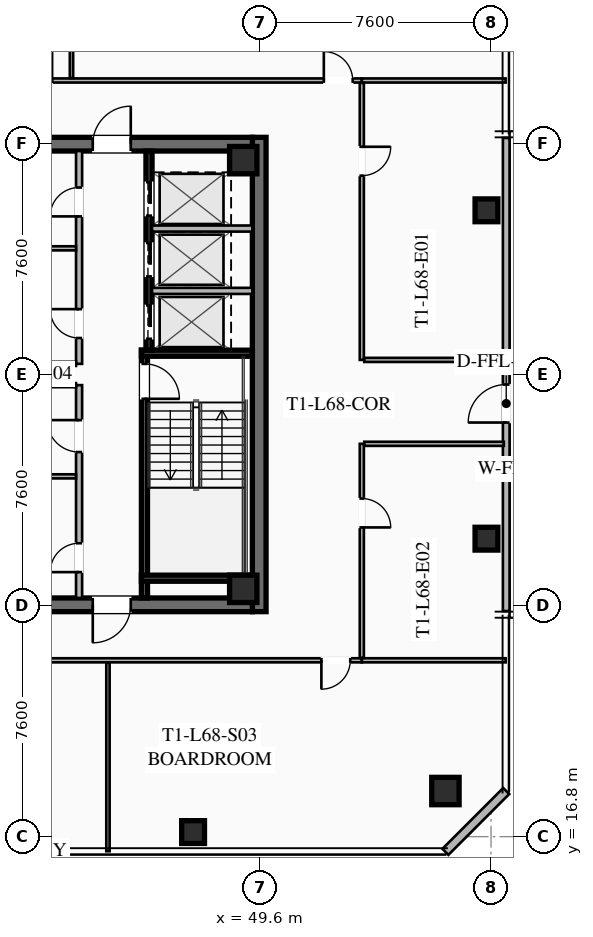
"""IFC4 building model, lengths in metres.
Left out: names, types, materials, properties, quantities, classifications, styles, units other than length and angle.
Written with IfcOpenShell. Run it as: python <this file> out.ifc"""

import sys

from ifc_helpers import new_model, si_unit, direction, frame, frame_2d, origin, origin_2d, place, context, subcontext, project, spatial, rectangle, hollow_rectangle, extrude, element, fill, save


model = new_model("IFC4")
c1 = context("Model", 3, precision=1e-05, world=origin(), true_north=direction((0.0, 1.0)))
c2 = subcontext(c1, "Body", "Model", "MODEL_VIEW")
j1 = project(units=[si_unit("LENGTHUNIT", "METRE"), si_unit("PLANEANGLEUNIT", "RADIAN")], contexts=[c1])
p1 = place(None, origin())
s1 = spatial("IfcSite", under=j1, at=p1, CompositionType="ELEMENT")
p2 = place(p1, origin())
s2 = spatial("IfcBuilding", under=s1, at=p2, CompositionType="ELEMENT")
p3 = place(p2, frame((0.0, 0.0, 251.4)))
s3 = spatial("IfcBuildingStorey", under=s2, at=p3, CompositionType="ELEMENT", Elevation=251.4)
p4 = place(p3, frame((49.575, 39.8, 0.0), z_axis=(0.0, 0.0, 1.0), x_axis=(0.0, -1.0, 0.0)))
e1 = element("IfcWall", 1, at=p4, inside=s3, PredefinedType="SHEAR", context=c2, shape_type="SweptSolid", body=[
    extrude(rectangle(XDim=15.6, YDim=0.45, at=frame_2d((7.8, 0.0))), origin(), (0.0, 0.0, 1.0), 4.0),
])
p5 = place(p3, frame((49.35, 24.425, 0.0), z_axis=(0.0, 0.0, 1.0), x_axis=(-1.0, 0.0, 0.0)))
e2 = element("IfcWall", 2, at=p5, inside=s3, PredefinedType="SHEAR", context=c2, shape_type="SweptSolid", body=[
    extrude(rectangle(XDim=14.7, YDim=0.45, at=frame_2d((7.35, 0.0))), origin(), (0.0, 0.0, 1.0), 4.0),
])
p6 = place(p5, frame((9.05, 0.0, 0.0)))
e3 = element("IfcOpeningElement", 3, at=p6, cuts=e2, PredefinedType="OPENING", context=c2, shape_type="SweptSolid", body=[
    extrude(rectangle(XDim=1.25, YDim=2.25, at=frame_2d((0.625, 1.125))), frame((0.0, 0.235, 0.0), z_axis=(0.0, -1.0, 0.0), x_axis=(1.0, 0.0, 0.0)), (0.0, 0.0, 1.0), 0.47),
])
p7 = place(p5, frame((4.0, 0.0, 0.0)))
e4 = element("IfcOpeningElement", 4, at=p7, cuts=e2, PredefinedType="OPENING", context=c2, shape_type="SweptSolid", body=[
    extrude(rectangle(XDim=1.25, YDim=2.25, at=frame_2d((0.625, 1.125))), frame((0.0, 0.235, 0.0), z_axis=(0.0, -1.0, 0.0), x_axis=(1.0, 0.0, 0.0)), (0.0, 0.0, 1.0), 0.47),
])
p8 = place(p3, frame((34.65, 39.575, 0.0), z_axis=(0.0, 0.0, 1.0), x_axis=(1.0, 0.0, 0.0)))
e5 = element("IfcWall", 5, at=p8, inside=s3, PredefinedType="SHEAR", context=c2, shape_type="SweptSolid", body=[
    extrude(rectangle(XDim=14.7, YDim=0.45, at=frame_2d((7.35, 0.0))), origin(), (0.0, 0.0, 1.0), 4.0),
])
p9 = place(p8, frame((4.4, 0.0, 0.0)))
e6 = element("IfcOpeningElement", 6, at=p9, cuts=e5, PredefinedType="OPENING", context=c2, shape_type="SweptSolid", body=[
    extrude(rectangle(XDim=1.25, YDim=2.25, at=frame_2d((0.625, 1.125))), frame((0.0, 0.235, 0.0), z_axis=(0.0, -1.0, 0.0), x_axis=(1.0, 0.0, 0.0)), (0.0, 0.0, 1.0), 0.47),
])
p10 = place(p8, frame((9.45, 0.0, 0.0)))
e7 = element("IfcOpeningElement", 7, at=p10, cuts=e5, PredefinedType="OPENING", context=c2, shape_type="SweptSolid", body=[
    extrude(rectangle(XDim=1.25, YDim=2.25, at=frame_2d((0.625, 1.125))), frame((0.0, 0.235, 0.0), z_axis=(0.0, -1.0, 0.0), x_axis=(1.0, 0.0, 0.0)), (0.0, 0.0, 1.0), 0.47),
])
for number, where, z_axis, x_axis in (
    (8, (49.05, 24.95, 0.0), (0.0, 0.0, 1.0), (1.0, 0.0, 0.0)),
    (9, (49.05, 39.05, 0.0), (0.0, 0.0, 1.0), (1.0, 0.0, 0.0)),
    (10, (55.7, 18.3, 0.0), (0.0, 0.0, 1.0), (1.0, 0.0, 0.0)),
):
    element("IfcColumn", number, at=place(p3, frame(where, z_axis=z_axis, x_axis=x_axis)), inside=s3, PredefinedType="COLUMN", context=c2, shape_type="SweptSolid", body=[
        extrude(hollow_rectangle(XDim=0.9, YDim=0.9, WallThickness=0.04, at=origin_2d()), origin(), (0.0, 0.0, 1.0), 3.78),
    ])
for number, where, z_axis, x_axis in (
    (11, (47.4, 16.95, 0.0), (0.0, 0.0, 1.0), (1.0, 0.0, 0.0)),
    (12, (57.05, 26.6, 0.0), (0.0, 0.0, 1.0), (1.0, 0.0, 0.0)),
    (13, (57.05, 37.4, 0.0), (0.0, 0.0, 1.0), (1.0, 0.0, 0.0)),
):
    element("IfcColumn", number, at=place(p3, frame(where, z_axis=z_axis, x_axis=x_axis)), inside=s3, PredefinedType="COLUMN", context=c2, shape_type="SweptSolid", body=[
        extrude(hollow_rectangle(XDim=0.75, YDim=0.75, WallThickness=0.032, at=origin_2d()), origin(), (0.0, 0.0, 1.0), 3.78),
    ])
p11 = place(p3, frame((57.7, 18.3, 0.0), z_axis=(0.0, 0.0, 1.0), x_axis=(-0.707106781187, -0.707106781187, 0.0)))
e14 = element("IfcWall", 14, at=p11, inside=s3, PredefinedType="SOLIDWALL", context=c2, shape_type="SweptSolid", body=[
    extrude(rectangle(XDim=2.828, YDim=0.28, at=frame_2d((1.414, 0.0))), origin(), (0.0, 0.0, 1.0), 3.78),
])
p12 = place(p3, frame((57.7, 24.22, 0.0), z_axis=(0.0, 0.0, 1.0), x_axis=(0.0, 1.0, 0.0)))
e15 = element("IfcWall", 15, at=p12, inside=s3, PredefinedType="SOLIDWALL", context=c2, shape_type="SweptSolid", body=[
    extrude(rectangle(XDim=15.56, YDim=0.22, at=frame_2d((7.78, 0.0))), origin(), (0.0, 0.0, 1.0), 2.971),
])
p13 = place(p12, frame((6.2, 0.0, 0.0)))
e16 = element("IfcOpeningElement", 16, at=p13, cuts=e15, PredefinedType="OPENING", context=c2, shape_type="SweptSolid", body=[
    extrude(rectangle(XDim=1.25, YDim=2.25, at=frame_2d((0.625, 1.125))), frame((0.0, 0.12, 0.0), z_axis=(0.0, -1.0, 0.0), x_axis=(1.0, 0.0, 0.0)), (0.0, 0.0, 1.0), 0.24),
])
p14 = place(p3, frame((45.8, 32.8, 0.0), z_axis=(0.0, 0.0, 1.0), x_axis=(0.0, -1.0, 0.0)))
e17 = element("IfcWall", 17, at=p14, inside=s3, PredefinedType="SHEAR", context=c2, shape_type="SweptSolid", body=[
    extrude(rectangle(XDim=8.15, YDim=0.2, at=frame_2d((4.075, 0.0))), origin(), (0.0, 0.0, 1.0), 3.78),
])
p15 = place(p14, frame((0.45, 0.0, 0.0)))
e18 = element("IfcOpeningElement", 18, at=p15, cuts=e17, PredefinedType="OPENING", context=c2, shape_type="SweptSolid", body=[
    extrude(rectangle(XDim=1.15, YDim=2.2, at=frame_2d((0.575, 1.1))), frame((0.0, 0.11, 0.0), z_axis=(0.0, -1.0, 0.0), x_axis=(1.0, 0.0, 0.0)), (0.0, 0.0, 1.0), 0.22),
])
for number, where, z_axis, x_axis in (
    (19, (45.7, 32.7, 0.0), (0.0, 0.0, 1.0), (1.0, 0.0, 0.0)),
    (20, (45.7, 25.3, 0.0), (0.0, 0.0, 1.0), (1.0, 0.0, 0.0)),
):
    element("IfcWall", number, at=place(p3, frame(where, z_axis=z_axis, x_axis=x_axis)), inside=s3, PredefinedType="SHEAR", context=c2, shape_type="SweptSolid", body=[
        extrude(rectangle(XDim=3.65, YDim=0.2, at=frame_2d((1.825, 0.0))), origin(), (0.0, 0.0, 1.0), 3.78),
    ])
p16 = place(p3, frame((45.95, 39.35, 0.0), z_axis=(0.0, 0.0, 1.0), x_axis=(0.0, -1.0, 0.0)))
e21 = element("IfcWall", 21, at=p16, inside=s3, PredefinedType="SHEAR", context=c2, shape_type="SweptSolid", body=[
    extrude(rectangle(XDim=6.55, YDim=0.2, at=frame_2d((3.275, 0.0))), origin(), (0.0, 0.0, 1.0), 3.78),
])
p17 = place(p16, frame((5.075, 0.0, 0.0)))
e22 = element("IfcOpeningElement", 22, at=p17, cuts=e21, PredefinedType="OPENING", context=c2, shape_type="SweptSolid", body=[
    extrude(rectangle(XDim=1.1, YDim=2.2, at=frame_2d((0.55, 1.1))), frame((0.0, 0.11, 0.0), z_axis=(0.0, -1.0, 0.0), x_axis=(1.0, 0.0, 0.0)), (0.0, 0.0, 1.0), 0.22),
])
p18 = place(p16, frame((3.025, 0.0, 0.0)))
e23 = element("IfcOpeningElement", 23, at=p18, cuts=e21, PredefinedType="OPENING", context=c2, shape_type="SweptSolid", body=[
    extrude(rectangle(XDim=1.1, YDim=2.2, at=frame_2d((0.55, 1.1))), frame((0.0, 0.11, 0.0), z_axis=(0.0, -1.0, 0.0), x_axis=(1.0, 0.0, 0.0)), (0.0, 0.0, 1.0), 0.22),
])
p19 = place(p16, frame((1.025, 0.0, 0.0)))
e24 = element("IfcOpeningElement", 24, at=p19, cuts=e21, PredefinedType="OPENING", context=c2, shape_type="SweptSolid", body=[
    extrude(rectangle(XDim=1.1, YDim=2.2, at=frame_2d((0.55, 1.1))), frame((0.0, 0.11, 0.0), z_axis=(0.0, -1.0, 0.0), x_axis=(1.0, 0.0, 0.0)), (0.0, 0.0, 1.0), 0.22),
])
for number, where, z_axis, x_axis in (
    (25, (46.05, 34.75, 0.0), (0.0, 0.0, 1.0), (1.0, 0.0, 0.0)),
    (26, (46.05, 36.8, 0.0), (0.0, 0.0, 1.0), (1.0, 0.0, 0.0)),
):
    element("IfcWall", number, at=place(p3, frame(where, z_axis=z_axis, x_axis=x_axis)), inside=s3, PredefinedType="SOLIDWALL", context=c2, shape_type="SweptSolid", body=[
        extrude(rectangle(XDim=3.3, YDim=0.2, at=frame_2d((1.65, 0.0))), origin(), (0.0, 0.0, 1.0), 3.78),
    ])
p20 = place(p3, frame((43.65, 24.65, 0.0), z_axis=(0.0, 0.0, 1.0), x_axis=(0.0, 1.0, 0.0)))
e27 = element("IfcWall", 27, at=p20, inside=s3, PredefinedType="SOLIDWALL", context=c2, shape_type="SweptSolid", body=[
    extrude(rectangle(XDim=7.0, YDim=0.2, at=frame_2d((3.5, 0.0))), origin(), (0.0, 0.0, 1.0), 2.971),
])
p21 = place(p20, frame((0.85, 0.0, 0.0)))
e28 = element("IfcOpeningElement", 28, at=p21, cuts=e27, PredefinedType="OPENING", context=c2, shape_type="SweptSolid", body=[
    extrude(rectangle(XDim=0.95, YDim=2.05, at=frame_2d((0.475, 1.025))), frame((0.0, 0.11, 0.0), z_axis=(0.0, -1.0, 0.0), x_axis=(1.0, 0.0, 0.0)), (0.0, 0.0, 1.0), 0.22),
])
p22 = place(p20, frame((4.8, 0.0, 0.0)))
e29 = element("IfcOpeningElement", 29, at=p22, cuts=e27, PredefinedType="OPENING", context=c2, shape_type="SweptSolid", body=[
    extrude(rectangle(XDim=1.05, YDim=2.2, at=frame_2d((0.525, 1.1))), frame((0.0, 0.11, 0.0), z_axis=(0.0, -1.0, 0.0), x_axis=(1.0, 0.0, 0.0)), (0.0, 0.0, 1.0), 0.22),
])
for number, where, z_axis, x_axis in (
    (30, (41.67, 31.65, 0.0), (0.0, 0.0, 1.0), (1.0, 0.0, 0.0)),
    (31, (41.67, 28.65, 0.0), (0.0, 0.0, 1.0), (1.0, 0.0, 0.0)),
):
    element("IfcWall", number, at=place(p3, frame(where, z_axis=z_axis, x_axis=x_axis)), inside=s3, PredefinedType="PARTITIONING", context=c2, shape_type="SweptSolid", body=[
        extrude(rectangle(XDim=1.88, YDim=0.135, at=frame_2d((0.94, 0.0))), origin(), (0.0, 0.0, 1.0), 2.971),
    ])
p23 = place(p3, frame((43.65, 32.35, 0.0), z_axis=(0.0, 0.0, 1.0), x_axis=(0.0, 1.0, 0.0)))
e32 = element("IfcWall", 32, at=p23, inside=s3, PredefinedType="SOLIDWALL", context=c2, shape_type="SweptSolid", body=[
    extrude(rectangle(XDim=7.0, YDim=0.2, at=frame_2d((3.5, 0.0))), origin(), (0.0, 0.0, 1.0), 2.971),
])
p24 = place(p23, frame((0.85, 0.0, 0.0)))
e33 = element("IfcOpeningElement", 33, at=p24, cuts=e32, PredefinedType="OPENING", context=c2, shape_type="SweptSolid", body=[
    extrude(rectangle(XDim=0.95, YDim=2.05, at=frame_2d((0.475, 1.025))), frame((0.0, 0.11, 0.0), z_axis=(0.0, -1.0, 0.0), x_axis=(1.0, 0.0, 0.0)), (0.0, 0.0, 1.0), 0.22),
])
p25 = place(p23, frame((4.85, 0.0, 0.0)))
e34 = element("IfcOpeningElement", 34, at=p25, cuts=e32, PredefinedType="OPENING", context=c2, shape_type="SweptSolid", body=[
    extrude(rectangle(XDim=0.95, YDim=2.05, at=frame_2d((0.475, 1.025))), frame((0.0, 0.11, 0.0), z_axis=(0.0, -1.0, 0.0), x_axis=(1.0, 0.0, 0.0)), (0.0, 0.0, 1.0), 0.22),
])
for number, where, z_axis, x_axis in (
    (35, (41.67, 32.35, 0.0), (0.0, 0.0, 1.0), (1.0, 0.0, 0.0)),
    (36, (41.67, 36.15, 0.0), (0.0, 0.0, 1.0), (1.0, 0.0, 0.0)),
):
    element("IfcWall", number, at=place(p3, frame(where, z_axis=z_axis, x_axis=x_axis)), inside=s3, PredefinedType="PARTITIONING", context=c2, shape_type="SweptSolid", body=[
        extrude(rectangle(XDim=1.88, YDim=0.135, at=frame_2d((0.94, 0.0))), origin(), (0.0, 0.0, 1.0), 2.971),
    ])
p26 = place(p3, frame((28.45, 41.67, 0.0), z_axis=(0.0, 0.0, 1.0), x_axis=(1.0, 0.0, 0.0)))
e37 = element("IfcWall", 37, at=p26, inside=s3, PredefinedType="PARTITIONING", context=c2, shape_type="SweptSolid", body=[
    extrude(rectangle(XDim=24.5, YDim=0.135, at=frame_2d((12.25, 0.0))), origin(), (0.0, 0.0, 1.0), 2.971),
])
p27 = place(p26, frame((0.3, 0.0, 0.0)))
e38 = element("IfcOpeningElement", 38, at=p27, cuts=e37, PredefinedType="OPENING", context=c2, shape_type="SweptSolid", body=[
    extrude(rectangle(XDim=0.95, YDim=2.05, at=frame_2d((0.475, 1.025))), frame((0.0, 0.077, 0.0), z_axis=(0.0, -1.0, 0.0), x_axis=(1.0, 0.0, 0.0)), (0.0, 0.0, 1.0), 0.155),
])
p28 = place(p26, frame((13.363, 0.0, 0.0)))
e39 = element("IfcOpeningElement", 39, at=p28, cuts=e37, PredefinedType="OPENING", context=c2, shape_type="SweptSolid", body=[
    extrude(rectangle(XDim=0.95, YDim=2.05, at=frame_2d((0.475, 1.025))), frame((0.0, 0.077, 0.0), z_axis=(0.0, -1.0, 0.0), x_axis=(1.0, 0.0, 0.0)), (0.0, 0.0, 1.0), 0.155),
])
p29 = place(p26, frame((23.25, 0.0, 0.0)))
e40 = element("IfcOpeningElement", 40, at=p29, cuts=e37, PredefinedType="OPENING", context=c2, shape_type="SweptSolid", body=[
    extrude(rectangle(XDim=0.95, YDim=2.05, at=frame_2d((0.475, 1.025))), frame((0.0, 0.077, 0.0), z_axis=(0.0, -1.0, 0.0), x_axis=(1.0, 0.0, 0.0)), (0.0, 0.0, 1.0), 0.155),
])
p30 = place(p3, frame((52.95, 41.67, 0.0), z_axis=(0.0, 0.0, 1.0), x_axis=(1.0, 0.0, 0.0)))
e41 = element("IfcWall", 41, at=p30, inside=s3, PredefinedType="PARTITIONING", context=c2, shape_type="SweptSolid", body=[
    extrude(rectangle(XDim=4.73, YDim=0.135, at=frame_2d((2.365, 0.0))), origin(), (0.0, 0.0, 1.0), 2.971),
])
p31 = place(p3, frame((43.4, 41.75, 0.0), z_axis=(0.0, 0.0, 1.0), x_axis=(0.0, 1.0, 0.0)))
e42 = element("IfcWall", 42, at=p31, inside=s3, PredefinedType="PARTITIONING", context=c2, shape_type="SweptSolid", body=[
    extrude(rectangle(XDim=5.93, YDim=0.11, at=frame_2d((2.965, 0.0))), origin(), (0.0, 0.0, 1.0), 2.971),
])
p32 = place(p3, frame((52.95, 22.6, 0.0), z_axis=(0.0, 0.0, 1.0), x_axis=(-1.0, 0.0, 0.0)))
e43 = element("IfcWall", 43, at=p32, inside=s3, PredefinedType="PARTITIONING", context=c2, shape_type="SweptSolid", body=[
    extrude(rectangle(XDim=24.5, YDim=0.135, at=frame_2d((12.25, 0.0))), origin(), (0.0, 0.0, 1.0), 2.971),
])
p33 = place(p32, frame((23.17, 0.0, 0.0)))
e44 = element("IfcOpeningElement", 44, at=p33, cuts=e43, PredefinedType="OPENING", context=c2, shape_type="SweptSolid", body=[
    extrude(rectangle(XDim=0.95, YDim=2.05, at=frame_2d((0.475, 1.025))), frame((0.0, 0.077, 0.0), z_axis=(0.0, -1.0, 0.0), x_axis=(1.0, 0.0, 0.0)), (0.0, 0.0, 1.0), 0.155),
])
p34 = place(p32, frame((10.238, 0.0, 0.0)))
e45 = element("IfcOpeningElement", 45, at=p34, cuts=e43, PredefinedType="OPENING", context=c2, shape_type="SweptSolid", body=[
    extrude(rectangle(XDim=0.95, YDim=2.05, at=frame_2d((0.475, 1.025))), frame((0.0, 0.077, 0.0), z_axis=(0.0, -1.0, 0.0), x_axis=(1.0, 0.0, 0.0)), (0.0, 0.0, 1.0), 0.155),
])
p35 = place(p32, frame((0.38, 0.0, 0.0)))
e46 = element("IfcOpeningElement", 46, at=p35, cuts=e43, PredefinedType="OPENING", context=c2, shape_type="SweptSolid", body=[
    extrude(rectangle(XDim=0.95, YDim=2.05, at=frame_2d((0.475, 1.025))), frame((0.0, 0.077, 0.0), z_axis=(0.0, -1.0, 0.0), x_axis=(1.0, 0.0, 0.0)), (0.0, 0.0, 1.0), 0.155),
])
p36 = place(p3, frame((52.95, 22.6, 0.0), z_axis=(0.0, 0.0, 1.0), x_axis=(1.0, 0.0, 0.0)))
e47 = element("IfcWall", 47, at=p36, inside=s3, PredefinedType="PARTITIONING", context=c2, shape_type="SweptSolid", body=[
    extrude(rectangle(XDim=4.73, YDim=0.135, at=frame_2d((2.365, 0.0))), origin(), (0.0, 0.0, 1.0), 2.971),
])
p37 = place(p3, frame((44.6, 16.32, 0.0), z_axis=(0.0, 0.0, 1.0), x_axis=(0.0, 1.0, 0.0)))
e48 = element("IfcWall", 48, at=p37, inside=s3, PredefinedType="PARTITIONING", context=c2, shape_type="SweptSolid", body=[
    extrude(rectangle(XDim=6.2, YDim=0.11, at=frame_2d((3.1, 0.0))), origin(), (0.0, 0.0, 1.0), 2.971),
])
p38 = place(p3, frame((52.95, 41.59, 0.0), z_axis=(0.0, 0.0, 1.0), x_axis=(0.0, -1.0, 0.0)))
e49 = element("IfcWall", 49, at=p38, inside=s3, PredefinedType="PARTITIONING", context=c2, shape_type="SweptSolid", body=[
    extrude(rectangle(XDim=9.11, YDim=0.135, at=frame_2d((4.555, 0.0))), origin(), (0.0, 0.0, 1.0), 2.971),
])
p39 = place(p38, frame((2.1, 0.0, 0.0)))
e50 = element("IfcOpeningElement", 50, at=p39, cuts=e49, PredefinedType="OPENING", context=c2, shape_type="SweptSolid", body=[
    extrude(rectangle(XDim=0.95, YDim=2.05, at=frame_2d((0.475, 1.025))), frame((0.0, 0.077, 0.0), z_axis=(0.0, -1.0, 0.0), x_axis=(1.0, 0.0, 0.0)), (0.0, 0.0, 1.0), 0.155),
])
p40 = place(p3, frame((52.95, 29.72, 0.0), z_axis=(0.0, 0.0, 1.0), x_axis=(0.0, -1.0, 0.0)))
e51 = element("IfcWall", 51, at=p40, inside=s3, PredefinedType="PARTITIONING", context=c2, shape_type="SweptSolid", body=[
    extrude(rectangle(XDim=7.04, YDim=0.135, at=frame_2d((3.52, 0.0))), origin(), (0.0, 0.0, 1.0), 2.971),
])
p41 = place(p40, frame((1.8, 0.0, 0.0)))
e52 = element("IfcOpeningElement", 52, at=p41, cuts=e51, PredefinedType="OPENING", context=c2, shape_type="SweptSolid", body=[
    extrude(rectangle(XDim=0.95, YDim=2.05, at=frame_2d((0.475, 1.025))), frame((0.0, 0.077, 0.0), z_axis=(0.0, -1.0, 0.0), x_axis=(1.0, 0.0, 0.0)), (0.0, 0.0, 1.0), 0.155),
])
for number, where, z_axis, x_axis in (
    (53, (53.03, 32.48, 0.0), (0.0, 0.0, 1.0), (1.0, 0.0, 0.0)),
    (54, (57.62, 29.72, 0.0), (0.0, 0.0, 1.0), (-1.0, 0.0, 0.0)),
):
    element("IfcWall", number, at=place(p3, frame(where, z_axis=z_axis, x_axis=x_axis)), inside=s3, PredefinedType="PARTITIONING", context=c2, shape_type="SweptSolid", body=[
        extrude(rectangle(XDim=4.59, YDim=0.135, at=frame_2d((2.295, 0.0))), origin(), (0.0, 0.0, 1.0), 2.971),
    ])
p42 = place(p13, origin())
e55 = element("IfcDoor", 55, at=p42, inside=s3, OperationType="SINGLE_SWING_LEFT", PredefinedType="DOOR", context=c2, shape_type="SweptSolid", body=[
    extrude(rectangle(XDim=1.25, YDim=2.25, at=frame_2d((0.625, 1.125))), frame((0.0, 0.025, 0.0), z_axis=(0.0, -1.0, 0.0), x_axis=(1.0, 0.0, 0.0)), (0.0, 0.0, 1.0), 0.05),
])
fill(e16, e55)
p43 = place(p10, origin())
e56 = element("IfcDoor", 56, at=p43, inside=s3, OperationType="SINGLE_SWING_RIGHT", PredefinedType="DOOR", context=c2, shape_type="SweptSolid", body=[
    extrude(rectangle(XDim=1.25, YDim=2.25, at=frame_2d((0.625, 1.125))), frame((0.0, 0.025, 0.0), z_axis=(0.0, -1.0, 0.0), x_axis=(1.0, 0.0, 0.0)), (0.0, 0.0, 1.0), 0.05),
])
fill(e7, e56)
p44 = place(p7, origin())
e57 = element("IfcDoor", 57, at=p44, inside=s3, OperationType="SINGLE_SWING_RIGHT", PredefinedType="DOOR", context=c2, shape_type="SweptSolid", body=[
    extrude(rectangle(XDim=1.25, YDim=2.25, at=frame_2d((0.625, 1.125))), frame((0.0, 0.025, 0.0), z_axis=(0.0, -1.0, 0.0), x_axis=(1.0, 0.0, 0.0)), (0.0, 0.0, 1.0), 0.05),
])
fill(e4, e57)
p45 = place(p15, origin())
e58 = element("IfcDoor", 58, at=p45, inside=s3, OperationType="SINGLE_SWING_RIGHT", PredefinedType="DOOR", context=c2, shape_type="SweptSolid", body=[
    extrude(rectangle(XDim=1.15, YDim=2.2, at=frame_2d((0.575, 1.1))), frame((0.0, 0.025, 0.0), z_axis=(0.0, -1.0, 0.0), x_axis=(1.0, 0.0, 0.0)), (0.0, 0.0, 1.0), 0.05),
])
fill(e18, e58)
p46 = place(p21, origin())
e59 = element("IfcDoor", 59, at=p46, inside=s3, OperationType="SINGLE_SWING_LEFT", PredefinedType="DOOR", context=c2, shape_type="SweptSolid", body=[
    extrude(rectangle(XDim=0.95, YDim=2.05, at=frame_2d((0.475, 1.025))), frame((0.0, 0.025, 0.0), z_axis=(0.0, -1.0, 0.0), x_axis=(1.0, 0.0, 0.0)), (0.0, 0.0, 1.0), 0.05),
])
fill(e28, e59)
p47 = place(p22, origin())
e60 = element("IfcDoor", 60, at=p47, inside=s3, OperationType="SINGLE_SWING_RIGHT", PredefinedType="DOOR", context=c2, shape_type="SweptSolid", body=[
    extrude(rectangle(XDim=1.05, YDim=2.2, at=frame_2d((0.525, 1.1))), frame((0.0, 0.025, 0.0), z_axis=(0.0, -1.0, 0.0), x_axis=(1.0, 0.0, 0.0)), (0.0, 0.0, 1.0), 0.05),
])
fill(e29, e60)
p48 = place(p24, origin())
e61 = element("IfcDoor", 61, at=p48, inside=s3, OperationType="SINGLE_SWING_RIGHT", PredefinedType="DOOR", context=c2, shape_type="SweptSolid", body=[
    extrude(rectangle(XDim=0.95, YDim=2.05, at=frame_2d((0.475, 1.025))), frame((0.0, 0.025, 0.0), z_axis=(0.0, -1.0, 0.0), x_axis=(1.0, 0.0, 0.0)), (0.0, 0.0, 1.0), 0.05),
])
fill(e33, e61)
p49 = place(p25, origin())
e62 = element("IfcDoor", 62, at=p49, inside=s3, OperationType="SINGLE_SWING_LEFT", PredefinedType="DOOR", context=c2, shape_type="SweptSolid", body=[
    extrude(rectangle(XDim=0.95, YDim=2.05, at=frame_2d((0.475, 1.025))), frame((0.0, 0.025, 0.0), z_axis=(0.0, -1.0, 0.0), x_axis=(1.0, 0.0, 0.0)), (0.0, 0.0, 1.0), 0.05),
])
fill(e34, e62)
p50 = place(p28, origin())
e63 = element("IfcDoor", 63, at=p50, inside=s3, OperationType="SINGLE_SWING_RIGHT", PredefinedType="DOOR", context=c2, shape_type="SweptSolid", body=[
    extrude(rectangle(XDim=0.95, YDim=2.05, at=frame_2d((0.475, 1.025))), frame((0.0, 0.025, 0.0), z_axis=(0.0, -1.0, 0.0), x_axis=(1.0, 0.0, 0.0)), (0.0, 0.0, 1.0), 0.05),
])
fill(e39, e63)
p51 = place(p29, origin())
e64 = element("IfcDoor", 64, at=p51, inside=s3, OperationType="SINGLE_SWING_LEFT", PredefinedType="DOOR", context=c2, shape_type="SweptSolid", body=[
    extrude(rectangle(XDim=0.95, YDim=2.05, at=frame_2d((0.475, 1.025))), frame((0.0, 0.025, 0.0), z_axis=(0.0, -1.0, 0.0), x_axis=(1.0, 0.0, 0.0)), (0.0, 0.0, 1.0), 0.05),
])
fill(e40, e64)
p52 = place(p35, origin())
e65 = element("IfcDoor", 65, at=p52, inside=s3, OperationType="SINGLE_SWING_RIGHT", PredefinedType="DOOR", context=c2, shape_type="SweptSolid", body=[
    extrude(rectangle(XDim=0.95, YDim=2.05, at=frame_2d((0.475, 1.025))), frame((0.0, 0.025, 0.0), z_axis=(0.0, -1.0, 0.0), x_axis=(1.0, 0.0, 0.0)), (0.0, 0.0, 1.0), 0.05),
])
fill(e46, e65)
p53 = place(p39, origin())
e66 = element("IfcDoor", 66, at=p53, inside=s3, OperationType="SINGLE_SWING_LEFT", PredefinedType="DOOR", context=c2, shape_type="SweptSolid", body=[
    extrude(rectangle(XDim=0.95, YDim=2.05, at=frame_2d((0.475, 1.025))), frame((0.0, 0.025, 0.0), z_axis=(0.0, -1.0, 0.0), x_axis=(1.0, 0.0, 0.0)), (0.0, 0.0, 1.0), 0.05),
])
fill(e50, e66)
p54 = place(p41, origin())
e67 = element("IfcDoor", 67, at=p54, inside=s3, OperationType="SINGLE_SWING_RIGHT", PredefinedType="DOOR", context=c2, shape_type="SweptSolid", body=[
    extrude(rectangle(XDim=0.95, YDim=2.05, at=frame_2d((0.475, 1.025))), frame((0.0, 0.025, 0.0), z_axis=(0.0, -1.0, 0.0), x_axis=(1.0, 0.0, 0.0)), (0.0, 0.0, 1.0), 0.05),
])
fill(e52, e67)
p55 = place(p17, origin())
e68 = element("IfcDoor", 68, at=p55, inside=s3, OperationType="SLIDING_TO_LEFT", PredefinedType="DOOR", context=c2, shape_type="SweptSolid", body=[
    extrude(rectangle(XDim=1.1, YDim=2.2, at=frame_2d((0.55, 1.1))), frame((0.0, 0.025, 0.0), z_axis=(0.0, -1.0, 0.0), x_axis=(1.0, 0.0, 0.0)), (0.0, 0.0, 1.0), 0.05),
])
fill(e22, e68)
p56 = place(p18, origin())
e69 = element("IfcDoor", 69, at=p56, inside=s3, OperationType="SLIDING_TO_LEFT", PredefinedType="DOOR", context=c2, shape_type="SweptSolid", body=[
    extrude(rectangle(XDim=1.1, YDim=2.2, at=frame_2d((0.55, 1.1))), frame((0.0, 0.025, 0.0), z_axis=(0.0, -1.0, 0.0), x_axis=(1.0, 0.0, 0.0)), (0.0, 0.0, 1.0), 0.05),
])
fill(e23, e69)
p57 = place(p19, origin())
e70 = element("IfcDoor", 70, at=p57, inside=s3, OperationType="SLIDING_TO_LEFT", PredefinedType="DOOR", context=c2, shape_type="SweptSolid", body=[
    extrude(rectangle(XDim=1.1, YDim=2.2, at=frame_2d((0.55, 1.1))), frame((0.0, 0.025, 0.0), z_axis=(0.0, -1.0, 0.0), x_axis=(1.0, 0.0, 0.0)), (0.0, 0.0, 1.0), 0.05),
])
fill(e24, e70)
save(model, sys.argv[1])
